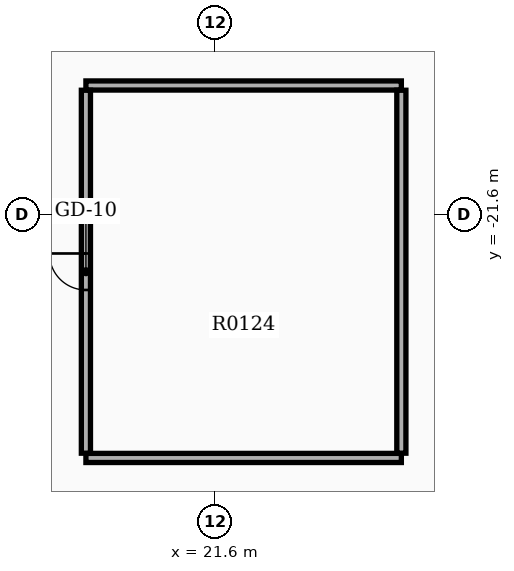
"""IFC4 building model, lengths in metres.
Left out: names, types, materials, properties, quantities, classifications, styles, units other than length and angle.
Written with IfcOpenShell. Run it as: python <this file> out.ifc"""

import sys

from ifc_helpers import new_model, si_unit, direction, frame, frame_2d, origin, place, context, subcontext, project, spatial, rectangle, extrude, element, fill, save


model = new_model("IFC4")
c1 = context("Model", 3, precision=1e-05, world=origin(), true_north=direction((0.0, 1.0)))
c2 = subcontext(c1, "Body", "Model", "MODEL_VIEW")
j1 = project(units=[si_unit("LENGTHUNIT", "METRE"), si_unit("PLANEANGLEUNIT", "RADIAN")], contexts=[c1])
p1 = place(None, origin())
s1 = spatial("IfcSite", under=j1, at=p1, CompositionType="ELEMENT")
p2 = place(p1, origin())
s2 = spatial("IfcBuilding", under=s1, at=p2, CompositionType="ELEMENT")
p3 = place(p2, origin())
s3 = spatial("IfcBuildingStorey", under=s2, at=p3, CompositionType="ELEMENT", Elevation=0.0)
for number, where, z_axis, x_axis in (
    (1, (18.2, -28.0, 0.0), (0.0, 0.0, 1.0), (1.0, 0.0, 0.0)),
    (2, (18.2, -18.2, 0.0), (0.0, 0.0, 1.0), (1.0, 0.0, 0.0)),
):
    element("IfcWall", number, at=place(p3, frame(where, z_axis=z_axis, x_axis=x_axis)), inside=s3, PredefinedType="SOLIDWALL", context=c2, shape_type="SweptSolid", body=[
        extrude(rectangle(XDim=8.3, YDim=0.24, at=frame_2d((4.15, 0.0))), origin(), (0.0, 0.0, 1.0), 2.67),
    ])
p4 = place(p3, frame((18.2, -27.875, 0.0), z_axis=(0.0, 0.0, 1.0), x_axis=(0.0, 1.0, 0.0)))
e3 = element("IfcWall", 3, at=p4, inside=s3, PredefinedType="SOLIDWALL", context=c2, shape_type="SweptSolid", body=[
    extrude(rectangle(XDim=9.55, YDim=0.24, at=frame_2d((4.775, 0.0))), origin(), (0.0, 0.0, 1.0), 2.67),
])
p5 = place(p4, frame((4.295, 0.0, 0.0)))
e4 = element("IfcOpeningElement", 4, at=p5, cuts=e3, PredefinedType="OPENING", context=c2, shape_type="SweptSolid", body=[
    extrude(rectangle(XDim=0.96, YDim=2.15, at=frame_2d((0.48, 1.075))), frame((0.0, 0.13, 0.0), z_axis=(0.0, -1.0, 0.0), x_axis=(1.0, 0.0, 0.0)), (0.0, 0.0, 1.0), 0.26),
])
p6 = place(p3, frame((26.5, -27.875, 0.0), z_axis=(0.0, 0.0, 1.0), x_axis=(0.0, 1.0, 0.0)))
e5 = element("IfcWall", 5, at=p6, inside=s3, PredefinedType="SOLIDWALL", context=c2, shape_type="SweptSolid", body=[
    extrude(rectangle(XDim=9.55, YDim=0.24, at=frame_2d((4.775, 0.0))), origin(), (0.0, 0.0, 1.0), 2.67),
])
p7 = place(p5, origin())
e6 = element("IfcDoor", 6, at=p7, inside=s3, OperationType="SINGLE_SWING_RIGHT", PredefinedType="DOOR", context=c2, shape_type="SweptSolid", body=[
    extrude(rectangle(XDim=0.96, YDim=2.15, at=frame_2d((0.48, 1.075))), frame((0.0, 0.025, 0.0), z_axis=(0.0, -1.0, 0.0), x_axis=(1.0, 0.0, 0.0)), (0.0, 0.0, 1.0), 0.05),
])
fill(e4, e6)
save(model, sys.argv[1])
